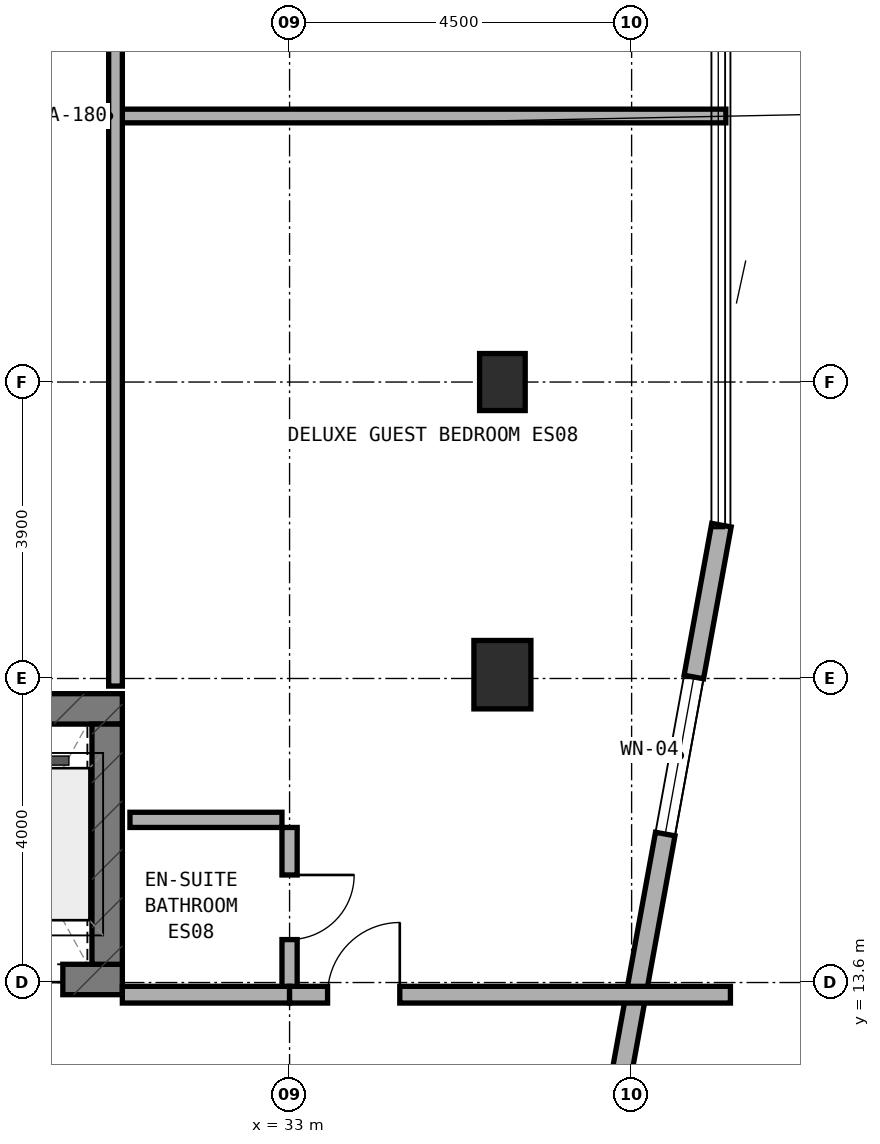
"""IFC4 building model, lengths in metres.
Left out: names, types, materials, properties, quantities, classifications, styles, units other than length and angle.
Written with IfcOpenShell. Run it as: python <this file> out.ifc"""

import sys

from ifc_helpers import new_model, si_unit, direction, frame, frame_2d, origin, origin_2d, place, context, subcontext, project, spatial, rectangle, extrude, element, fill, save


model = new_model("IFC4")
c1 = context("Model", 3, precision=1e-05, world=origin(), true_north=direction((0.0, 1.0)))
c2 = subcontext(c1, "Body", "Model", "MODEL_VIEW")
j1 = project(units=[si_unit("LENGTHUNIT", "METRE"), si_unit("PLANEANGLEUNIT", "RADIAN")], contexts=[c1])
p1 = place(None, origin())
s1 = spatial("IfcSite", under=j1, at=p1, CompositionType="ELEMENT")
p2 = place(p1, origin())
s2 = spatial("IfcBuilding", under=s1, at=p2, CompositionType="ELEMENT")
p3 = place(p2, frame((0.0, 0.0, 250.4)))
s3 = spatial("IfcBuildingStorey", under=s2, at=p3, CompositionType="ELEMENT", Elevation=250.4)
p4 = place(p3, frame((6.4, 13.64, 0.0), z_axis=(0.0, 0.0, 1.0), x_axis=(1.0, 0.0, 0.0)))
e1 = element("IfcWall", 1, at=p4, inside=s3, PredefinedType="SHEAR", context=c2, shape_type="SweptSolid", body=[
    extrude(rectangle(XDim=24.4, YDim=0.4, at=frame_2d((12.2, 0.0))), origin(), (0.0, 0.0, 1.0), 3.6),
])
p5 = place(p4, frame((9.15, 0.0, 0.0)))
e2 = element("IfcOpeningElement", 2, at=p5, cuts=e1, PredefinedType="OPENING", context=c2, shape_type="SweptSolid", body=[
    extrude(rectangle(XDim=1.2, YDim=2.15, at=frame_2d((0.6, 1.075))), frame((0.0, 0.21, 0.0), z_axis=(0.0, -1.0, 0.0), x_axis=(1.0, 0.0, 0.0)), (0.0, 0.0, 1.0), 0.42),
])
p6 = place(p4, frame((16.94, 0.0, 0.0)))
e3 = element("IfcOpeningElement", 3, at=p6, cuts=e1, PredefinedType="OPENING", context=c2, shape_type="SweptSolid", body=[
    extrude(rectangle(XDim=0.85, YDim=2.1, at=frame_2d((0.425, 1.05))), frame((0.0, 0.21, 0.0), z_axis=(0.0, -1.0, 0.0), x_axis=(1.0, 0.0, 0.0)), (0.0, 0.0, 1.0), 0.42),
])
p7 = place(p4, frame((18.783, 0.0, 0.0)))
e4 = element("IfcOpeningElement", 4, at=p7, cuts=e1, PredefinedType="OPENING", context=c2, shape_type="SweptSolid", body=[
    extrude(rectangle(XDim=1.1, YDim=2.15, at=frame_2d((0.55, 1.075))), frame((0.0, 0.21, 0.0), z_axis=(0.0, -1.0, 0.0), x_axis=(1.0, 0.0, 0.0)), (0.0, 0.0, 1.0), 0.42),
])
p8 = place(p4, frame((20.65, 0.0, 0.0)))
e5 = element("IfcOpeningElement", 5, at=p8, cuts=e1, PredefinedType="OPENING", context=c2, shape_type="SweptSolid", body=[
    extrude(rectangle(XDim=1.1, YDim=2.15, at=frame_2d((0.55, 1.075))), frame((0.0, 0.21, 0.0), z_axis=(0.0, -1.0, 0.0), x_axis=(1.0, 0.0, 0.0)), (0.0, 0.0, 1.0), 0.42),
])
p9 = place(p4, frame((22.517, 0.0, 0.0)))
e6 = element("IfcOpeningElement", 6, at=p9, cuts=e1, PredefinedType="OPENING", context=c2, shape_type="SweptSolid", body=[
    extrude(rectangle(XDim=1.1, YDim=2.15, at=frame_2d((0.55, 1.075))), frame((0.0, 0.21, 0.0), z_axis=(0.0, -1.0, 0.0), x_axis=(1.0, 0.0, 0.0)), (0.0, 0.0, 1.0), 0.42),
])
p10 = place(p3, frame((6.4, 17.2, 0.0), z_axis=(0.0, 0.0, 1.0), x_axis=(1.0, 0.0, 0.0)))
e7 = element("IfcWall", 7, at=p10, inside=s3, PredefinedType="SHEAR", context=c2, shape_type="SweptSolid", body=[
    extrude(rectangle(XDim=24.4, YDim=0.4, at=frame_2d((12.2, 0.0))), origin(), (0.0, 0.0, 1.0), 3.6),
])
p11 = place(p3, frame((30.6, 13.84, 0.0), z_axis=(0.0, 0.0, 1.0), x_axis=(0.0, 1.0, 0.0)))
e8 = element("IfcWall", 8, at=p11, inside=s3, PredefinedType="SHEAR", context=c2, shape_type="SweptSolid", body=[
    extrude(rectangle(XDim=3.16, YDim=0.4, at=frame_2d((1.58, 0.0))), origin(), (0.0, 0.0, 1.0), 3.6),
])
p12 = place(p3, frame((35.8, 21.5, 0.0), z_axis=(0.0, 0.0, 1.0), x_axis=(1.0, 0.0, 0.0)))
e9 = element("IfcColumn", 9, at=p12, inside=s3, PredefinedType="COLUMN", context=c2, shape_type="SweptSolid", body=[
    extrude(rectangle(XDim=0.6, YDim=0.75, at=origin_2d()), origin(), (0.0, 0.0, 1.0), 3.6),
])
p13 = place(p3, frame((35.8, 17.65, 0.0), z_axis=(0.0, 0.0, 1.0), x_axis=(1.0, 0.0, 0.0)))
e10 = element("IfcColumn", 10, at=p13, inside=s3, PredefinedType="COLUMN", context=c2, shape_type="SweptSolid", body=[
    extrude(rectangle(XDim=0.75, YDim=0.9, at=origin_2d()), origin(), (0.0, 0.0, 1.0), 3.6),
])
p14 = place(p3, frame((37.171, 11.315, 0.0), z_axis=(0.0, 0.0, 1.0), x_axis=(0.179061111398, 0.983837953316, 0.0)))
e11 = element("IfcWall", 11, at=p14, inside=s3, PredefinedType="STANDARD", context=c2, shape_type="SweptSolid", body=[
    extrude(rectangle(XDim=8.438, YDim=0.26, at=frame_2d((4.219, 0.0))), origin(), (0.0, 0.0, 1.0), 3.32),
])
p15 = place(p14, frame((4.308, 0.0, 0.85)))
e12 = element("IfcOpeningElement", 12, at=p15, cuts=e11, PredefinedType="OPENING", context=c2, shape_type="SweptSolid", body=[
    extrude(rectangle(XDim=2.1, YDim=1.5, at=frame_2d((1.05, 0.75))), frame((0.0, 0.14, 0.0), z_axis=(0.0, -1.0, 0.0), x_axis=(1.0, 0.0, 0.0)), (0.0, 0.0, 1.0), 0.28),
])
p16 = place(p3, frame((30.8, 25.0, 0.0), z_axis=(0.0, 0.0, 1.0), x_axis=(1.0, 0.0, 0.0)))
e13 = element("IfcWall", 13, at=p16, inside=s3, PredefinedType="SOLIDWALL", context=c2, shape_type="SweptSolid", body=[
    extrude(rectangle(XDim=7.94, YDim=0.18, at=frame_2d((3.97, 0.0))), origin(), (0.0, 0.0, 1.0), 3.015),
])
p17 = place(p3, frame((30.71, 17.5, 0.0), z_axis=(0.0, 0.0, 1.0), x_axis=(0.0, 1.0, 0.0)))
e14 = element("IfcWall", 14, at=p17, inside=s3, PredefinedType="SOLIDWALL", context=c2, shape_type="SweptSolid", body=[
    extrude(rectangle(XDim=15.0, YDim=0.18, at=frame_2d((7.5, 0.0))), origin(), (0.0, 0.0, 1.0), 2.745),
])
p18 = place(p3, frame((33.0, 13.54, 0.0), z_axis=(0.0, 0.0, 1.0), x_axis=(0.0, 1.0, 0.0)))
e15 = element("IfcWall", 15, at=p18, inside=s3, PredefinedType="PLUMBINGWALL", context=c2, shape_type="SweptSolid", body=[
    extrude(rectangle(XDim=2.1, YDim=0.2, at=frame_2d((1.05, 0.0))), origin(), (0.0, 0.0, 1.0), 3.32),
])
p19 = place(p18, frame((0.625, 0.0, 0.0)))
e16 = element("IfcOpeningElement", 16, at=p19, cuts=e15, PredefinedType="OPENING", context=c2, shape_type="SweptSolid", body=[
    extrude(rectangle(XDim=0.85, YDim=2.1, at=frame_2d((0.425, 1.05))), frame((0.0, 0.11, 0.0), z_axis=(0.0, -1.0, 0.0), x_axis=(1.0, 0.0, 0.0)), (0.0, 0.0, 1.0), 0.22),
])
p20 = place(p3, frame((30.9, 15.74, 0.0), z_axis=(0.0, 0.0, 1.0), x_axis=(1.0, 0.0, 0.0)))
e17 = element("IfcWall", 17, at=p20, inside=s3, PredefinedType="PLUMBINGWALL", context=c2, shape_type="SweptSolid", body=[
    extrude(rectangle(XDim=2.0, YDim=0.2, at=frame_2d((1.0, 0.0))), origin(), (0.0, 0.0, 1.0), 3.32),
])
p21 = place(p3, frame((30.8, 13.44, 0.0), z_axis=(0.0, 0.0, 1.0), x_axis=(1.0, 0.0, 0.0)))
e18 = element("IfcWall", 18, at=p21, inside=s3, PredefinedType="SOLIDWALL", context=c2, shape_type="SweptSolid", body=[
    extrude(rectangle(XDim=2.2, YDim=0.22, at=frame_2d((1.1, 0.0))), origin(), (0.0, 0.0, 1.0), 3.32),
])
p22 = place(p3, frame((33.0, 13.44, 0.0), z_axis=(0.0, 0.0, 1.0), x_axis=(1.0, 0.0, 0.0)))
e19 = element("IfcWall", 19, at=p22, inside=s3, PredefinedType="SOLIDWALL", context=c2, shape_type="SweptSolid", body=[
    extrude(rectangle(XDim=5.8, YDim=0.22, at=frame_2d((2.9, 0.0))), origin(), (0.0, 0.0, 1.0), 2.745),
])
p23 = place(p22, frame((0.5, 0.0, 0.0)))
e20 = element("IfcOpeningElement", 20, at=p23, cuts=e19, PredefinedType="OPENING", context=c2, shape_type="SweptSolid", body=[
    extrude(rectangle(XDim=0.95, YDim=2.1, at=frame_2d((0.475, 1.05))), frame((0.0, 0.12, 0.0), z_axis=(0.0, -1.0, 0.0), x_axis=(1.0, 0.0, 0.0)), (0.0, 0.0, 1.0), 0.24),
])
p24 = place(p15, origin())
e21 = element("IfcWindow", 21, at=p24, inside=s3, PartitioningType="SINGLE_PANEL", PredefinedType="WINDOW", context=c2, shape_type="SweptSolid", body=[
    extrude(rectangle(XDim=2.1, YDim=1.5, at=frame_2d((1.05, 0.75))), frame((0.0, 0.03, 0.0), z_axis=(0.0, -1.0, 0.0), x_axis=(1.0, 0.0, 0.0)), (0.0, 0.0, 1.0), 0.06),
])
fill(e12, e21)
p25 = place(p9, frame((1.1, 0.0, 0.0), z_axis=(0.0, 0.0, 1.0), x_axis=(-1.0, 0.0, 0.0)))
e22 = element("IfcDoor", 22, at=p25, inside=s3, OperationType="DOUBLE_DOOR_SLIDING", PredefinedType="DOOR", context=c2, shape_type="SweptSolid", body=[
    extrude(rectangle(XDim=1.1, YDim=2.15, at=frame_2d((0.55, 1.075))), frame((0.0, 0.025, 0.0), z_axis=(0.0, -1.0, 0.0), x_axis=(1.0, 0.0, 0.0)), (0.0, 0.0, 1.0), 0.05),
])
fill(e6, e22)
p26 = place(p19, frame((0.85, 0.0, 0.0), z_axis=(0.0, 0.0, 1.0), x_axis=(-1.0, 0.0, 0.0)))
e23 = element("IfcDoor", 23, at=p26, inside=s3, OperationType="SINGLE_SWING_LEFT", PredefinedType="DOOR", context=c2, shape_type="SweptSolid", body=[
    extrude(rectangle(XDim=0.85, YDim=2.1, at=frame_2d((0.425, 1.05))), frame((0.0, 0.025, 0.0), z_axis=(0.0, -1.0, 0.0), x_axis=(1.0, 0.0, 0.0)), (0.0, 0.0, 1.0), 0.05),
])
fill(e16, e23)
p27 = place(p23, origin())
e24 = element("IfcDoor", 24, at=p27, inside=s3, OperationType="SINGLE_SWING_RIGHT", PredefinedType="DOOR", context=c2, shape_type="SweptSolid", body=[
    extrude(rectangle(XDim=0.95, YDim=2.1, at=frame_2d((0.475, 1.05))), frame((0.0, 0.025, 0.0), z_axis=(0.0, -1.0, 0.0), x_axis=(1.0, 0.0, 0.0)), (0.0, 0.0, 1.0), 0.05),
])
fill(e20, e24)
save(model, sys.argv[1])
